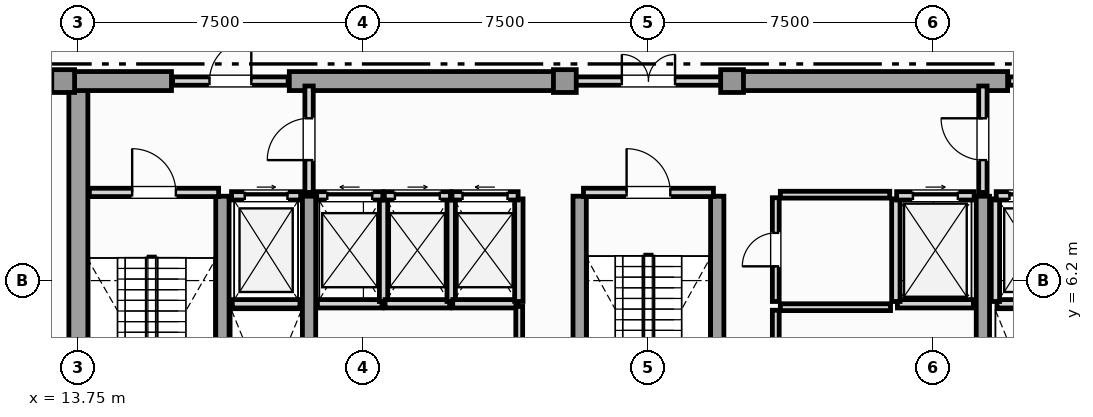
"""IFC4 building model, lengths in metres.
Left out: names, types, materials, properties, quantities, classifications, styles, units other than length and angle.
Written with IfcOpenShell. Run it as: python <this file> out.ifc"""

import sys

from ifc_helpers import new_model, si_unit, direction, frame, frame_2d, origin, origin_2d, place, context, subcontext, project, spatial, rectangle, extrude, element, fill, save


model = new_model("IFC4")
c1 = context("Model", 3, precision=1e-05, world=origin(), true_north=direction((0.0, 1.0)))
c2 = subcontext(c1, "Body", "Model", "MODEL_VIEW")
j1 = project(units=[si_unit("LENGTHUNIT", "METRE"), si_unit("PLANEANGLEUNIT", "RADIAN")], contexts=[c1])
p1 = place(None, origin())
s1 = spatial("IfcSite", under=j1, at=p1, CompositionType="ELEMENT")
p2 = place(p1, origin())
s2 = spatial("IfcBuilding", under=s1, at=p2, CompositionType="ELEMENT")
p3 = place(p2, frame((0.0, 0.0, 332.3)))
s3 = spatial("IfcBuildingStorey", under=s2, at=p3, CompositionType="ELEMENT", Elevation=332.3)
p4 = place(p3, frame((13.75, 0.92, 0.0), z_axis=(0.0, 0.0, 1.0), x_axis=(0.0, 1.0, 0.0)))
e1 = element("IfcWall", 1, at=p4, inside=s3, PredefinedType="SHEAR", context=c2, shape_type="SweptSolid", body=[
    extrude(rectangle(XDim=10.53, YDim=0.5, at=frame_2d((5.265, 0.0))), origin(), (0.0, 0.0, 1.0), 4.98),
])
p5 = place(p3, frame((13.25, 11.45, 0.0), z_axis=(0.0, 0.0, 1.0), x_axis=(1.0, 0.0, 0.0)))
e2 = element("IfcWall", 2, at=p5, inside=s3, PredefinedType="SHEAR", context=c2, shape_type="SweptSolid", body=[
    extrude(rectangle(XDim=2.95, YDim=0.5, at=frame_2d((1.475, 0.0))), origin(), (0.0, 0.0, 1.0), 4.98),
])
for number, where, z_axis, x_axis in (
    (3, (19.3, 11.45, 0.0), (0.0, 0.0, 1.0), (1.0, 0.0, 0.0)),
    (4, (30.9, 11.45, 0.0), (0.0, 0.0, 1.0), (1.0, 0.0, 0.0)),
):
    element("IfcWall", number, at=place(p3, frame(where, z_axis=z_axis, x_axis=x_axis)), inside=s3, PredefinedType="SHEAR", context=c2, shape_type="SweptSolid", body=[
        extrude(rectangle(XDim=7.3, YDim=0.5, at=frame_2d((3.65, 0.0))), origin(), (0.0, 0.0, 1.0), 4.98),
    ])
for number, where, z_axis, x_axis in (
    (5, (17.54, 0.92, 0.0), (0.0, 0.0, 1.0), (0.0, 1.0, 0.0)),
    (6, (19.82, 0.92, 0.0), (0.0, 0.0, 1.0), (0.0, 1.0, 0.0)),
    (7, (26.94, 0.92, 0.0), (0.0, 0.0, 1.0), (0.0, 1.0, 0.0)),
    (8, (30.56, 0.92, 0.0), (0.0, 0.0, 1.0), (0.0, 1.0, 0.0)),
    (9, (37.55, 0.92, 0.0), (0.0, 0.0, 1.0), (0.0, 1.0, 0.0)),
):
    element("IfcWall", number, at=place(p3, frame(where, z_axis=z_axis, x_axis=x_axis)), inside=s3, PredefinedType="SHEAR", context=c2, shape_type="SweptSolid", body=[
        extrude(rectangle(XDim=7.5, YDim=0.35, at=frame_2d((3.75, 0.0))), origin(), (0.0, 0.0, 1.0), 4.98),
    ])
for number, where, z_axis, x_axis in (
    (10, (13.35, 11.45, 0.0), (0.0, 0.0, 1.0), (1.0, 0.0, 0.0)),
    (11, (26.55, 11.45, 0.0), (0.0, 0.0, 1.0), (1.0, 0.0, 0.0)),
    (12, (30.95, 11.45, 0.0), (0.0, 0.0, 1.0), (1.0, 0.0, 0.0)),
):
    element("IfcColumn", number, at=place(p3, frame(where, z_axis=z_axis, x_axis=x_axis)), inside=s3, PredefinedType="COLUMN", context=c2, shape_type="SweptSolid", body=[
        extrude(rectangle(XDim=0.6, YDim=0.6, at=origin_2d()), origin(), (0.0, 0.0, 1.0), 5.2),
    ])
p6 = place(p3, frame((17.8, 5.59, 0.0), z_axis=(0.0, 0.0, 1.0), x_axis=(1.0, 0.0, 0.0)))
e13 = element("IfcWall", 13, at=p6, inside=s3, PredefinedType="SOLIDWALL", context=c2, shape_type="SweptSolid", body=[
    extrude(rectangle(XDim=1.78, YDim=0.22, at=frame_2d((0.89, 0.0))), origin(), (0.0, 0.0, 1.0), 4.98),
])
p7 = place(p3, frame((17.78, 8.43, 0.0), z_axis=(0.0, 0.0, 1.0), x_axis=(1.0, 0.0, 0.0)))
e14 = element("IfcWall", 14, at=p7, inside=s3, PredefinedType="SOLIDWALL", context=c2, shape_type="SweptSolid", body=[
    extrude(rectangle(XDim=1.82, YDim=0.22, at=frame_2d((0.91, 0.0))), origin(), (0.0, 0.0, 1.0), 4.98),
])
p8 = place(p7, frame((0.35, 0.0, 0.0)))
e15 = element("IfcOpeningElement", 15, at=p8, cuts=e14, PredefinedType="OPENING", context=c2, shape_type="SweptSolid", body=[
    extrude(rectangle(XDim=1.12, YDim=2.25, at=frame_2d((0.56, 1.125))), frame((0.0, 0.12, 0.0), z_axis=(0.0, -1.0, 0.0), x_axis=(1.0, 0.0, 0.0)), (0.0, 0.0, 1.0), 0.24),
])
p9 = place(p3, frame((37.92, 5.59, 0.0), z_axis=(0.0, 0.0, 1.0), x_axis=(1.0, 0.0, 0.0)))
e16 = element("IfcWall", 16, at=p9, inside=s3, PredefinedType="SOLIDWALL", context=c2, shape_type="SweptSolid", body=[
    extrude(rectangle(XDim=1.78, YDim=0.22, at=frame_2d((0.89, 0.0))), origin(), (0.0, 0.0, 1.0), 4.98),
])
p10 = place(p3, frame((37.88, 5.65, 0.0), z_axis=(0.0, 0.0, 1.0), x_axis=(0.0, 1.0, 0.0)))
e17 = element("IfcWall", 17, at=p10, inside=s3, PredefinedType="SOLIDWALL", context=c2, shape_type="SweptSolid", body=[
    extrude(rectangle(XDim=2.7, YDim=0.22, at=frame_2d((1.35, 0.0))), origin(), (0.0, 0.0, 1.0), 4.98),
])
p11 = place(p3, frame((37.9, 8.43, 0.0), z_axis=(0.0, 0.0, 1.0), x_axis=(1.0, 0.0, 0.0)))
e18 = element("IfcWall", 18, at=p11, inside=s3, PredefinedType="SOLIDWALL", context=c2, shape_type="SweptSolid", body=[
    extrude(rectangle(XDim=1.82, YDim=0.22, at=frame_2d((0.91, 0.0))), origin(), (0.0, 0.0, 1.0), 4.98),
])
p12 = place(p11, frame((0.35, 0.0, 0.0)))
e19 = element("IfcOpeningElement", 19, at=p12, cuts=e18, PredefinedType="OPENING", context=c2, shape_type="SweptSolid", body=[
    extrude(rectangle(XDim=1.12, YDim=2.25, at=frame_2d((0.56, 1.125))), frame((0.0, 0.12, 0.0), z_axis=(0.0, -1.0, 0.0), x_axis=(1.0, 0.0, 0.0)), (0.0, 0.0, 1.0), 0.24),
])
p13 = place(p3, frame((35.3, 5.59, 0.0), z_axis=(0.0, 0.0, 1.0), x_axis=(1.0, 0.0, 0.0)))
e20 = element("IfcWall", 20, at=p13, inside=s3, PredefinedType="SOLIDWALL", context=c2, shape_type="SweptSolid", body=[
    extrude(rectangle(XDim=2.0, YDim=0.22, at=frame_2d((1.0, 0.0))), origin(), (0.0, 0.0, 1.0), 4.98),
])
p14 = place(p3, frame((35.26, 5.65, 0.0), z_axis=(0.0, 0.0, 1.0), x_axis=(0.0, 1.0, 0.0)))
e21 = element("IfcWall", 21, at=p14, inside=s3, PredefinedType="SOLIDWALL", context=c2, shape_type="SweptSolid", body=[
    extrude(rectangle(XDim=2.7, YDim=0.22, at=frame_2d((1.35, 0.0))), origin(), (0.0, 0.0, 1.0), 4.98),
])
p15 = place(p3, frame((35.28, 8.43, 0.0), z_axis=(0.0, 0.0, 1.0), x_axis=(1.0, 0.0, 0.0)))
e22 = element("IfcWall", 22, at=p15, inside=s3, PredefinedType="SOLIDWALL", context=c2, shape_type="SweptSolid", body=[
    extrude(rectangle(XDim=2.04, YDim=0.22, at=frame_2d((1.02, 0.0))), origin(), (0.0, 0.0, 1.0), 4.98),
])
p16 = place(p15, frame((0.43, 0.0, 0.0)))
e23 = element("IfcOpeningElement", 23, at=p16, cuts=e22, PredefinedType="OPENING", context=c2, shape_type="SweptSolid", body=[
    extrude(rectangle(XDim=1.18, YDim=2.2, at=frame_2d((0.59, 1.1))), frame((0.0, 0.12, 0.0), z_axis=(0.0, -1.0, 0.0), x_axis=(1.0, 0.0, 0.0)), (0.0, 0.0, 1.0), 0.24),
])
p17 = place(p3, frame((20.04, 5.59, 0.0), z_axis=(0.0, 0.0, 1.0), x_axis=(1.0, 0.0, 0.0)))
e24 = element("IfcWall", 24, at=p17, inside=s3, PredefinedType="SOLIDWALL", context=c2, shape_type="SweptSolid", body=[
    extrude(rectangle(XDim=1.7, YDim=0.22, at=frame_2d((0.85, 0.0))), origin(), (0.0, 0.0, 1.0), 4.98),
])
p18 = place(p3, frame((21.78, 5.65, 0.0), z_axis=(0.0, 0.0, 1.0), x_axis=(0.0, 1.0, 0.0)))
e25 = element("IfcWall", 25, at=p18, inside=s3, PredefinedType="SOLIDWALL", context=c2, shape_type="SweptSolid", body=[
    extrude(rectangle(XDim=2.7, YDim=0.22, at=frame_2d((1.35, 0.0))), origin(), (0.0, 0.0, 1.0), 4.98),
])
p19 = place(p3, frame((20.02, 8.43, 0.0), z_axis=(0.0, 0.0, 1.0), x_axis=(1.0, 0.0, 0.0)))
e26 = element("IfcWall", 26, at=p19, inside=s3, PredefinedType="SOLIDWALL", context=c2, shape_type="SweptSolid", body=[
    extrude(rectangle(XDim=1.74, YDim=0.22, at=frame_2d((0.87, 0.0))), origin(), (0.0, 0.0, 1.0), 4.98),
])
p20 = place(p19, frame((0.28, 0.0, 0.0)))
e27 = element("IfcOpeningElement", 27, at=p20, cuts=e26, PredefinedType="OPENING", context=c2, shape_type="SweptSolid", body=[
    extrude(rectangle(XDim=1.18, YDim=2.2, at=frame_2d((0.59, 1.1))), frame((0.0, 0.12, 0.0), z_axis=(0.0, -1.0, 0.0), x_axis=(1.0, 0.0, 0.0)), (0.0, 0.0, 1.0), 0.24),
])
p21 = place(p3, frame((21.82, 5.59, 0.0), z_axis=(0.0, 0.0, 1.0), x_axis=(1.0, 0.0, 0.0)))
e28 = element("IfcWall", 28, at=p21, inside=s3, PredefinedType="SOLIDWALL", context=c2, shape_type="SweptSolid", body=[
    extrude(rectangle(XDim=1.7, YDim=0.22, at=frame_2d((0.85, 0.0))), origin(), (0.0, 0.0, 1.0), 4.98),
])
p22 = place(p3, frame((23.56, 5.65, 0.0), z_axis=(0.0, 0.0, 1.0), x_axis=(0.0, 1.0, 0.0)))
e29 = element("IfcWall", 29, at=p22, inside=s3, PredefinedType="SOLIDWALL", context=c2, shape_type="SweptSolid", body=[
    extrude(rectangle(XDim=2.7, YDim=0.22, at=frame_2d((1.35, 0.0))), origin(), (0.0, 0.0, 1.0), 4.98),
])
p23 = place(p3, frame((21.8, 8.43, 0.0), z_axis=(0.0, 0.0, 1.0), x_axis=(1.0, 0.0, 0.0)))
e30 = element("IfcWall", 30, at=p23, inside=s3, PredefinedType="SOLIDWALL", context=c2, shape_type="SweptSolid", body=[
    extrude(rectangle(XDim=1.74, YDim=0.22, at=frame_2d((0.87, 0.0))), origin(), (0.0, 0.0, 1.0), 4.98),
])
p24 = place(p23, frame((0.28, 0.0, 0.0)))
e31 = element("IfcOpeningElement", 31, at=p24, cuts=e30, PredefinedType="OPENING", context=c2, shape_type="SweptSolid", body=[
    extrude(rectangle(XDim=1.18, YDim=2.2, at=frame_2d((0.59, 1.1))), frame((0.0, 0.12, 0.0), z_axis=(0.0, -1.0, 0.0), x_axis=(1.0, 0.0, 0.0)), (0.0, 0.0, 1.0), 0.24),
])
p25 = place(p3, frame((23.6, 5.59, 0.0), z_axis=(0.0, 0.0, 1.0), x_axis=(1.0, 0.0, 0.0)))
e32 = element("IfcWall", 32, at=p25, inside=s3, PredefinedType="SOLIDWALL", context=c2, shape_type="SweptSolid", body=[
    extrude(rectangle(XDim=1.7, YDim=0.22, at=frame_2d((0.85, 0.0))), origin(), (0.0, 0.0, 1.0), 4.98),
])
p26 = place(p3, frame((25.34, 5.65, 0.0), z_axis=(0.0, 0.0, 1.0), x_axis=(0.0, 1.0, 0.0)))
e33 = element("IfcWall", 33, at=p26, inside=s3, PredefinedType="SOLIDWALL", context=c2, shape_type="SweptSolid", body=[
    extrude(rectangle(XDim=2.7, YDim=0.22, at=frame_2d((1.35, 0.0))), origin(), (0.0, 0.0, 1.0), 4.98),
])
p27 = place(p3, frame((23.58, 8.43, 0.0), z_axis=(0.0, 0.0, 1.0), x_axis=(1.0, 0.0, 0.0)))
e34 = element("IfcWall", 34, at=p27, inside=s3, PredefinedType="SOLIDWALL", context=c2, shape_type="SweptSolid", body=[
    extrude(rectangle(XDim=1.74, YDim=0.22, at=frame_2d((0.87, 0.0))), origin(), (0.0, 0.0, 1.0), 4.98),
])
p28 = place(p27, frame((0.28, 0.0, 0.0)))
e35 = element("IfcOpeningElement", 35, at=p28, cuts=e34, PredefinedType="OPENING", context=c2, shape_type="SweptSolid", body=[
    extrude(rectangle(XDim=1.18, YDim=2.2, at=frame_2d((0.59, 1.1))), frame((0.0, 0.12, 0.0), z_axis=(0.0, -1.0, 0.0), x_axis=(1.0, 0.0, 0.0)), (0.0, 0.0, 1.0), 0.24),
])
p29 = place(p3, frame((14.04, 8.52, 0.0), z_axis=(0.0, 0.0, 1.0), x_axis=(1.0, 0.0, 0.0)))
e36 = element("IfcWall", 36, at=p29, inside=s3, PredefinedType="SOLIDWALL", context=c2, shape_type="SweptSolid", body=[
    extrude(rectangle(XDim=3.4, YDim=0.22, at=frame_2d((1.7, 0.0))), origin(), (0.0, 0.0, 1.0), 4.98),
])
p30 = place(p29, frame((1.125, 0.0, 0.0)))
e37 = element("IfcOpeningElement", 37, at=p30, cuts=e36, PredefinedType="OPENING", context=c2, shape_type="SweptSolid", body=[
    extrude(rectangle(XDim=1.15, YDim=2.2, at=frame_2d((0.575, 1.1))), frame((0.0, 0.12, 0.0), z_axis=(0.0, -1.0, 0.0), x_axis=(1.0, 0.0, 0.0)), (0.0, 0.0, 1.0), 0.24),
])
p31 = place(p3, frame((27.04, 8.52, 0.0), z_axis=(0.0, 0.0, 1.0), x_axis=(1.0, 0.0, 0.0)))
e38 = element("IfcWall", 38, at=p31, inside=s3, PredefinedType="SOLIDWALL", context=c2, shape_type="SweptSolid", body=[
    extrude(rectangle(XDim=3.42, YDim=0.22, at=frame_2d((1.71, 0.0))), origin(), (0.0, 0.0, 1.0), 4.98),
])
p32 = place(p31, frame((1.135, 0.0, 0.0)))
e39 = element("IfcOpeningElement", 39, at=p32, cuts=e38, PredefinedType="OPENING", context=c2, shape_type="SweptSolid", body=[
    extrude(rectangle(XDim=1.15, YDim=2.2, at=frame_2d((0.575, 1.1))), frame((0.0, 0.12, 0.0), z_axis=(0.0, -1.0, 0.0), x_axis=(1.0, 0.0, 0.0)), (0.0, 0.0, 1.0), 0.24),
])
p33 = place(p3, frame((19.82, 8.52, 0.0), z_axis=(0.0, 0.0, 1.0), x_axis=(0.0, 1.0, 0.0)))
e40 = element("IfcWall", 40, at=p33, inside=s3, PredefinedType="SOLIDWALL", context=c2, shape_type="SweptSolid", body=[
    extrude(rectangle(XDim=2.8, YDim=0.22, at=frame_2d((1.4, 0.0))), origin(), (0.0, 0.0, 1.0), 4.436),
])
p34 = place(p33, frame((0.85, 0.0, 0.0)))
e41 = element("IfcOpeningElement", 41, at=p34, cuts=e40, PredefinedType="OPENING", context=c2, shape_type="SweptSolid", body=[
    extrude(rectangle(XDim=1.1, YDim=2.2, at=frame_2d((0.55, 1.1))), frame((0.0, 0.12, 0.0), z_axis=(0.0, -1.0, 0.0), x_axis=(1.0, 0.0, 0.0)), (0.0, 0.0, 1.0), 0.24),
])
p35 = place(p3, frame((37.55, 8.52, 0.0), z_axis=(0.0, 0.0, 1.0), x_axis=(0.0, 1.0, 0.0)))
e42 = element("IfcWall", 42, at=p35, inside=s3, PredefinedType="SOLIDWALL", context=c2, shape_type="SweptSolid", body=[
    extrude(rectangle(XDim=2.8, YDim=0.22, at=frame_2d((1.4, 0.0))), origin(), (0.0, 0.0, 1.0), 4.436),
])
p36 = place(p35, frame((0.85, 0.0, 0.0)))
e43 = element("IfcOpeningElement", 43, at=p36, cuts=e42, PredefinedType="OPENING", context=c2, shape_type="SweptSolid", body=[
    extrude(rectangle(XDim=1.1, YDim=2.2, at=frame_2d((0.55, 1.1))), frame((0.0, 0.12, 0.0), z_axis=(0.0, -1.0, 0.0), x_axis=(1.0, 0.0, 0.0)), (0.0, 0.0, 1.0), 0.24),
])
p37 = place(p3, frame((16.23, 11.45, 0.0), z_axis=(0.0, 0.0, 1.0), x_axis=(1.0, 0.0, 0.0)))
e44 = element("IfcWall", 44, at=p37, inside=s3, PredefinedType="SOLIDWALL", context=c2, shape_type="SweptSolid", body=[
    extrude(rectangle(XDim=3.04, YDim=0.22, at=frame_2d((1.52, 0.0))), origin(), (0.0, 0.0, 1.0), 4.98),
])
p38 = place(p37, frame((0.97, 0.0, 0.0)))
e45 = element("IfcOpeningElement", 45, at=p38, cuts=e44, PredefinedType="OPENING", context=c2, shape_type="SweptSolid", body=[
    extrude(rectangle(XDim=1.1, YDim=2.2, at=frame_2d((0.55, 1.1))), frame((0.0, 0.12, 0.0), z_axis=(0.0, -1.0, 0.0), x_axis=(1.0, 0.0, 0.0)), (0.0, 0.0, 1.0), 0.24),
])
p39 = place(p3, frame((26.63, 11.45, 0.0), z_axis=(0.0, 0.0, 1.0), x_axis=(1.0, 0.0, 0.0)))
e46 = element("IfcWall", 46, at=p39, inside=s3, PredefinedType="SOLIDWALL", context=c2, shape_type="SweptSolid", body=[
    extrude(rectangle(XDim=4.24, YDim=0.22, at=frame_2d((2.12, 0.0))), origin(), (0.0, 0.0, 1.0), 4.98),
])
p40 = place(p39, frame((1.42, 0.0, 0.0)))
e47 = element("IfcOpeningElement", 47, at=p40, cuts=e46, PredefinedType="OPENING", context=c2, shape_type="SweptSolid", body=[
    extrude(rectangle(XDim=1.4, YDim=2.2, at=frame_2d((0.7, 1.1))), frame((0.0, 0.12, 0.0), z_axis=(0.0, -1.0, 0.0), x_axis=(1.0, 0.0, 0.0)), (0.0, 0.0, 1.0), 0.24),
])
p41 = place(p3, frame((38.23, 11.45, 0.0), z_axis=(0.0, 0.0, 1.0), x_axis=(1.0, 0.0, 0.0)))
e48 = element("IfcWall", 48, at=p41, inside=s3, PredefinedType="SOLIDWALL", context=c2, shape_type="SweptSolid", body=[
    extrude(rectangle(XDim=3.04, YDim=0.22, at=frame_2d((1.52, 0.0))), origin(), (0.0, 0.0, 1.0), 4.98),
])
p42 = place(p41, frame((0.97, 0.0, 0.0)))
e49 = element("IfcOpeningElement", 49, at=p42, cuts=e48, PredefinedType="OPENING", context=c2, shape_type="SweptSolid", body=[
    extrude(rectangle(XDim=1.1, YDim=2.2, at=frame_2d((0.55, 1.1))), frame((0.0, 0.12, 0.0), z_axis=(0.0, -1.0, 0.0), x_axis=(1.0, 0.0, 0.0)), (0.0, 0.0, 1.0), 0.24),
])
p43 = place(p3, frame((25.35, 0.9, 0.0), z_axis=(0.0, 0.0, 1.0), x_axis=(0.0, 1.0, 0.0)))
e50 = element("IfcWall", 50, at=p43, inside=s3, PredefinedType="PARTITIONING", context=c2, shape_type="SweptSolid", body=[
    extrude(rectangle(XDim=4.62, YDim=0.18, at=frame_2d((2.31, 0.0))), origin(), (0.0, 0.0, 1.0), 4.98),
])
p44 = place(p43, frame((1.87, 0.0, 0.0)))
e51 = element("IfcOpeningElement", 51, at=p44, cuts=e50, PredefinedType="OPENING", context=c2, shape_type="SweptSolid", body=[
    extrude(rectangle(XDim=0.88, YDim=2.05, at=frame_2d((0.44, 1.025))), frame((0.0, 0.1, 0.0), z_axis=(0.0, -1.0, 0.0), x_axis=(1.0, 0.0, 0.0)), (0.0, 0.0, 1.0), 0.2),
])
p45 = place(p3, frame((32.1, 3.0, 0.0), z_axis=(0.0, 0.0, 1.0), x_axis=(0.0, 1.0, 0.0)))
e52 = element("IfcWall", 52, at=p45, inside=s3, PredefinedType="PARTITIONING", context=c2, shape_type="SweptSolid", body=[
    extrude(rectangle(XDim=2.42, YDim=0.18, at=frame_2d((1.21, 0.0))), origin(), (0.0, 0.0, 1.0), 4.98),
])
p46 = place(p45, frame((0.77, 0.0, 0.0)))
e53 = element("IfcOpeningElement", 53, at=p46, cuts=e52, PredefinedType="OPENING", context=c2, shape_type="SweptSolid", body=[
    extrude(rectangle(XDim=0.88, YDim=2.05, at=frame_2d((0.44, 1.025))), frame((0.0, 0.1, 0.0), z_axis=(0.0, -1.0, 0.0), x_axis=(1.0, 0.0, 0.0)), (0.0, 0.0, 1.0), 0.2),
])
p47 = place(p3, frame((32.22, 5.5, 0.0), z_axis=(0.0, 0.0, 1.0), x_axis=(1.0, 0.0, 0.0)))
e54 = element("IfcWall", 54, at=p47, inside=s3, PredefinedType="PARTITIONING", context=c2, shape_type="SweptSolid", body=[
    extrude(rectangle(XDim=2.9, YDim=0.18, at=frame_2d((1.45, 0.0))), origin(), (0.0, 0.0, 1.0), 4.98),
])
p48 = place(p3, frame((32.1, 5.65, 0.0), z_axis=(0.0, 0.0, 1.0), x_axis=(0.0, 1.0, 0.0)))
e55 = element("IfcWall", 55, at=p48, inside=s3, PredefinedType="PARTITIONING", context=c2, shape_type="SweptSolid", body=[
    extrude(rectangle(XDim=2.73, YDim=0.18, at=frame_2d((1.365, 0.0))), origin(), (0.0, 0.0, 1.0), 4.98),
])
p49 = place(p48, frame((0.925, 0.0, 0.0)))
e56 = element("IfcOpeningElement", 56, at=p49, cuts=e55, PredefinedType="OPENING", context=c2, shape_type="SweptSolid", body=[
    extrude(rectangle(XDim=0.88, YDim=2.05, at=frame_2d((0.44, 1.025))), frame((0.0, 0.1, 0.0), z_axis=(0.0, -1.0, 0.0), x_axis=(1.0, 0.0, 0.0)), (0.0, 0.0, 1.0), 0.2),
])
p50 = place(p3, frame((32.22, 8.46, 0.0), z_axis=(0.0, 0.0, 1.0), x_axis=(1.0, 0.0, 0.0)))
e57 = element("IfcWall", 57, at=p50, inside=s3, PredefinedType="PARTITIONING", context=c2, shape_type="SweptSolid", body=[
    extrude(rectangle(XDim=2.88, YDim=0.18, at=frame_2d((1.44, 0.0))), origin(), (0.0, 0.0, 1.0), 4.98),
])
p51 = place(p8, origin())
e58 = element("IfcDoor", 58, at=p51, inside=s3, OperationType="SLIDING_TO_RIGHT", PredefinedType="DOOR", context=c2, shape_type="SweptSolid", body=[
    extrude(rectangle(XDim=1.12, YDim=2.25, at=frame_2d((0.56, 1.125))), frame((0.0, 0.025, 0.0), z_axis=(0.0, -1.0, 0.0), x_axis=(1.0, 0.0, 0.0)), (0.0, 0.0, 1.0), 0.05),
])
fill(e15, e58)
p52 = place(p12, origin())
e59 = element("IfcDoor", 59, at=p52, inside=s3, OperationType="SLIDING_TO_LEFT", PredefinedType="DOOR", context=c2, shape_type="SweptSolid", body=[
    extrude(rectangle(XDim=1.12, YDim=2.25, at=frame_2d((0.56, 1.125))), frame((0.0, 0.025, 0.0), z_axis=(0.0, -1.0, 0.0), x_axis=(1.0, 0.0, 0.0)), (0.0, 0.0, 1.0), 0.05),
])
fill(e19, e59)
p53 = place(p16, origin())
e60 = element("IfcDoor", 60, at=p53, inside=s3, OperationType="SLIDING_TO_RIGHT", PredefinedType="DOOR", context=c2, shape_type="SweptSolid", body=[
    extrude(rectangle(XDim=1.18, YDim=2.2, at=frame_2d((0.59, 1.1))), frame((0.0, 0.025, 0.0), z_axis=(0.0, -1.0, 0.0), x_axis=(1.0, 0.0, 0.0)), (0.0, 0.0, 1.0), 0.05),
])
fill(e23, e60)
p54 = place(p20, origin())
e61 = element("IfcDoor", 61, at=p54, inside=s3, OperationType="SLIDING_TO_LEFT", PredefinedType="DOOR", context=c2, shape_type="SweptSolid", body=[
    extrude(rectangle(XDim=1.18, YDim=2.2, at=frame_2d((0.59, 1.1))), frame((0.0, 0.025, 0.0), z_axis=(0.0, -1.0, 0.0), x_axis=(1.0, 0.0, 0.0)), (0.0, 0.0, 1.0), 0.05),
])
fill(e27, e61)
p55 = place(p24, origin())
e62 = element("IfcDoor", 62, at=p55, inside=s3, OperationType="SLIDING_TO_RIGHT", PredefinedType="DOOR", context=c2, shape_type="SweptSolid", body=[
    extrude(rectangle(XDim=1.18, YDim=2.2, at=frame_2d((0.59, 1.1))), frame((0.0, 0.025, 0.0), z_axis=(0.0, -1.0, 0.0), x_axis=(1.0, 0.0, 0.0)), (0.0, 0.0, 1.0), 0.05),
])
fill(e31, e62)
p56 = place(p28, origin())
e63 = element("IfcDoor", 63, at=p56, inside=s3, OperationType="SLIDING_TO_LEFT", PredefinedType="DOOR", context=c2, shape_type="SweptSolid", body=[
    extrude(rectangle(XDim=1.18, YDim=2.2, at=frame_2d((0.59, 1.1))), frame((0.0, 0.025, 0.0), z_axis=(0.0, -1.0, 0.0), x_axis=(1.0, 0.0, 0.0)), (0.0, 0.0, 1.0), 0.05),
])
fill(e35, e63)
p57 = place(p30, origin())
e64 = element("IfcDoor", 64, at=p57, inside=s3, OperationType="SINGLE_SWING_LEFT", PredefinedType="DOOR", context=c2, shape_type="SweptSolid", body=[
    extrude(rectangle(XDim=1.15, YDim=2.2, at=frame_2d((0.575, 1.1))), frame((0.0, 0.025, 0.0), z_axis=(0.0, -1.0, 0.0), x_axis=(1.0, 0.0, 0.0)), (0.0, 0.0, 1.0), 0.05),
])
fill(e37, e64)
p58 = place(p32, origin())
e65 = element("IfcDoor", 65, at=p58, inside=s3, OperationType="SINGLE_SWING_LEFT", PredefinedType="DOOR", context=c2, shape_type="SweptSolid", body=[
    extrude(rectangle(XDim=1.15, YDim=2.2, at=frame_2d((0.575, 1.1))), frame((0.0, 0.025, 0.0), z_axis=(0.0, -1.0, 0.0), x_axis=(1.0, 0.0, 0.0)), (0.0, 0.0, 1.0), 0.05),
])
fill(e39, e65)
p59 = place(p34, origin())
e66 = element("IfcDoor", 66, at=p59, inside=s3, OperationType="SINGLE_SWING_LEFT", PredefinedType="DOOR", context=c2, shape_type="SweptSolid", body=[
    extrude(rectangle(XDim=1.1, YDim=2.2, at=frame_2d((0.55, 1.1))), frame((0.0, 0.025, 0.0), z_axis=(0.0, -1.0, 0.0), x_axis=(1.0, 0.0, 0.0)), (0.0, 0.0, 1.0), 0.05),
])
fill(e41, e66)
p60 = place(p36, origin())
e67 = element("IfcDoor", 67, at=p60, inside=s3, OperationType="SINGLE_SWING_RIGHT", PredefinedType="DOOR", context=c2, shape_type="SweptSolid", body=[
    extrude(rectangle(XDim=1.1, YDim=2.2, at=frame_2d((0.55, 1.1))), frame((0.0, 0.025, 0.0), z_axis=(0.0, -1.0, 0.0), x_axis=(1.0, 0.0, 0.0)), (0.0, 0.0, 1.0), 0.05),
])
fill(e43, e67)
p61 = place(p38, origin())
e68 = element("IfcDoor", 68, at=p61, inside=s3, OperationType="SINGLE_SWING_RIGHT", PredefinedType="DOOR", context=c2, shape_type="SweptSolid", body=[
    extrude(rectangle(XDim=1.1, YDim=2.2, at=frame_2d((0.55, 1.1))), frame((0.0, 0.025, 0.0), z_axis=(0.0, -1.0, 0.0), x_axis=(1.0, 0.0, 0.0)), (0.0, 0.0, 1.0), 0.05),
])
fill(e45, e68)
p62 = place(p40, origin())
e69 = element("IfcDoor", 69, at=p62, inside=s3, OperationType="DOUBLE_DOOR_SINGLE_SWING", PredefinedType="DOOR", context=c2, shape_type="SweptSolid", body=[
    extrude(rectangle(XDim=1.4, YDim=2.2, at=frame_2d((0.7, 1.1))), frame((0.0, 0.025, 0.0), z_axis=(0.0, -1.0, 0.0), x_axis=(1.0, 0.0, 0.0)), (0.0, 0.0, 1.0), 0.05),
])
fill(e47, e69)
p63 = place(p49, origin())
e70 = element("IfcDoor", 70, at=p63, inside=s3, OperationType="SINGLE_SWING_LEFT", PredefinedType="DOOR", context=c2, shape_type="SweptSolid", body=[
    extrude(rectangle(XDim=0.88, YDim=2.05, at=frame_2d((0.44, 1.025))), frame((0.0, 0.025, 0.0), z_axis=(0.0, -1.0, 0.0), x_axis=(1.0, 0.0, 0.0)), (0.0, 0.0, 1.0), 0.05),
])
fill(e56, e70)
save(model, sys.argv[1])
